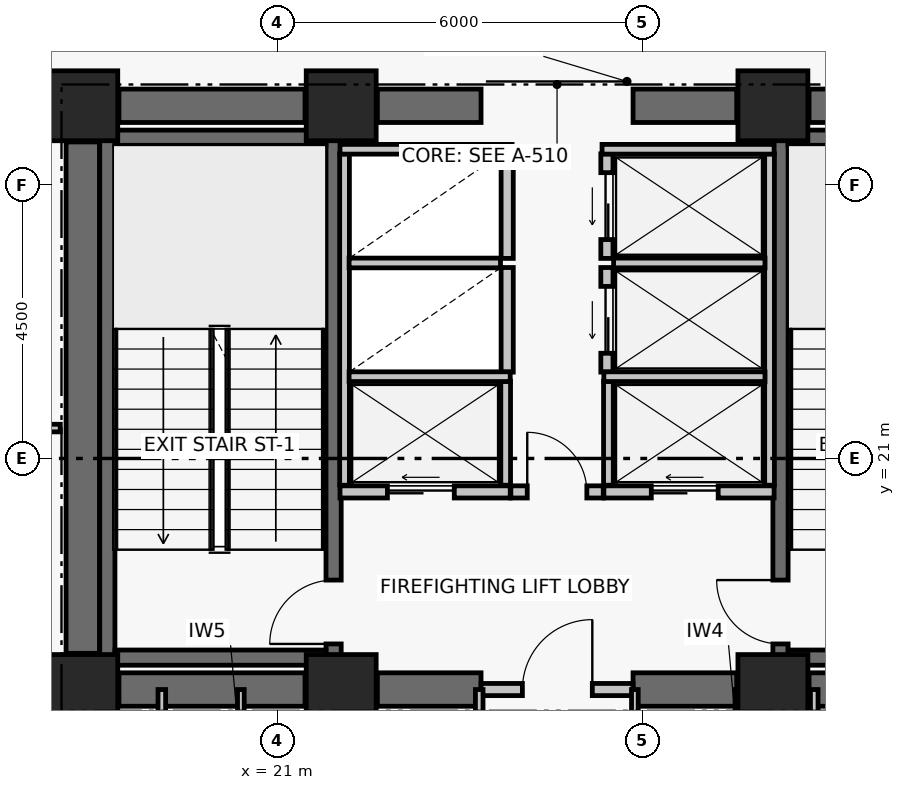
"""IFC4 building model, lengths in metres.
Left out: names, types, materials, properties, quantities, classifications, styles, units other than length and angle.
Written with IfcOpenShell. Run it as: python <this file> out.ifc"""

import sys

from ifc_helpers import new_model, si_unit, direction, frame, frame_2d, origin, origin_2d, place, context, subcontext, project, spatial, rectangle, extrude, element, fill, save


model = new_model("IFC4")
c1 = context("Model", 3, precision=1e-05, world=origin(), true_north=direction((0.0, 1.0)))
c2 = subcontext(c1, "Body", "Model", "MODEL_VIEW")
j1 = project(units=[si_unit("LENGTHUNIT", "METRE"), si_unit("PLANEANGLEUNIT", "RADIAN")], contexts=[c1])
p1 = place(None, origin())
s1 = spatial("IfcSite", under=j1, at=p1, CompositionType="ELEMENT")
p2 = place(p1, origin())
s2 = spatial("IfcBuilding", under=s1, at=p2, CompositionType="ELEMENT")
p3 = place(p2, frame((0.0, 0.0, 103.98)))
s3 = spatial("IfcBuildingStorey", under=s2, at=p3, CompositionType="ELEMENT", Elevation=103.98)
for number, where, z_axis, x_axis in (
    (1, (17.8, 17.2, 0.0), (0.0, 0.0, 1.0), (1.0, 0.0, 0.0)),
    (2, (22.05, 17.2, 0.0), (0.0, 0.0, 1.0), (1.0, 0.0, 0.0)),
    (3, (29.15, 17.2, 0.0), (0.0, 0.0, 1.0), (1.0, 0.0, 0.0)),
    (4, (17.8, 26.8, 0.0), (0.0, 0.0, 1.0), (1.0, 0.0, 0.0)),
    (5, (22.05, 26.8, 0.0), (0.0, 0.0, 1.0), (1.0, 0.0, 0.0)),
    (6, (29.15, 26.8, 0.0), (0.0, 0.0, 1.0), (1.0, 0.0, 0.0)),
):
    element("IfcColumn", number, at=place(p3, frame(where, z_axis=z_axis, x_axis=x_axis)), inside=s3, PredefinedType="COLUMN", context=c2, shape_type="SweptSolid", body=[
        extrude(rectangle(XDim=1.15, YDim=1.15, at=origin_2d()), origin(), (0.0, 0.0, 1.0), 3.72),
    ])
p4 = place(p3, frame((18.395, 17.2, 0.0), z_axis=(0.0, 0.0, 1.0), x_axis=(1.0, 0.0, 0.0)))
e7 = element("IfcWall", 7, at=p4, inside=s3, PredefinedType="SHEAR", context=c2, shape_type="SweptSolid", body=[
    extrude(rectangle(XDim=3.06, YDim=0.55, at=frame_2d((1.53, 0.0))), origin(), (0.0, 0.0, 1.0), 3.47),
])
p5 = place(p3, frame((22.645, 17.2, 0.0), z_axis=(0.0, 0.0, 1.0), x_axis=(1.0, 0.0, 0.0)))
e8 = element("IfcWall", 8, at=p5, inside=s3, PredefinedType="SHEAR", context=c2, shape_type="SweptSolid", body=[
    extrude(rectangle(XDim=1.705, YDim=0.55, at=frame_2d((0.853, 0.0))), origin(), (0.0, 0.0, 1.0), 3.47),
])
p6 = place(p3, frame((26.85, 17.2, 0.0), z_axis=(0.0, 0.0, 1.0), x_axis=(1.0, 0.0, 0.0)))
e9 = element("IfcWall", 9, at=p6, inside=s3, PredefinedType="SHEAR", context=c2, shape_type="SweptSolid", body=[
    extrude(rectangle(XDim=1.705, YDim=0.55, at=frame_2d((0.853, 0.0))), origin(), (0.0, 0.0, 1.0), 3.47),
])
p7 = place(p3, frame((29.745, 17.2, 0.0), z_axis=(0.0, 0.0, 1.0), x_axis=(1.0, 0.0, 0.0)))
e10 = element("IfcWall", 10, at=p7, inside=s3, PredefinedType="SHEAR", context=c2, shape_type="SweptSolid", body=[
    extrude(rectangle(XDim=3.06, YDim=0.55, at=frame_2d((1.53, 0.0))), origin(), (0.0, 0.0, 1.0), 3.47),
])
p8 = place(p3, frame((18.395, 26.8, 0.0), z_axis=(0.0, 0.0, 1.0), x_axis=(1.0, 0.0, 0.0)))
e11 = element("IfcWall", 11, at=p8, inside=s3, PredefinedType="SHEAR", context=c2, shape_type="SweptSolid", body=[
    extrude(rectangle(XDim=3.06, YDim=0.55, at=frame_2d((1.53, 0.0))), origin(), (0.0, 0.0, 1.0), 3.47),
])
p9 = place(p3, frame((22.645, 26.8, 0.0), z_axis=(0.0, 0.0, 1.0), x_axis=(1.0, 0.0, 0.0)))
e12 = element("IfcWall", 12, at=p9, inside=s3, PredefinedType="SHEAR", context=c2, shape_type="SweptSolid", body=[
    extrude(rectangle(XDim=1.705, YDim=0.55, at=frame_2d((0.853, 0.0))), origin(), (0.0, 0.0, 1.0), 3.47),
])
p10 = place(p3, frame((26.85, 26.8, 0.0), z_axis=(0.0, 0.0, 1.0), x_axis=(1.0, 0.0, 0.0)))
e13 = element("IfcWall", 13, at=p10, inside=s3, PredefinedType="SHEAR", context=c2, shape_type="SweptSolid", body=[
    extrude(rectangle(XDim=1.705, YDim=0.55, at=frame_2d((0.853, 0.0))), origin(), (0.0, 0.0, 1.0), 3.47),
])
p11 = place(p3, frame((29.745, 26.8, 0.0), z_axis=(0.0, 0.0, 1.0), x_axis=(1.0, 0.0, 0.0)))
e14 = element("IfcWall", 14, at=p11, inside=s3, PredefinedType="SHEAR", context=c2, shape_type="SweptSolid", body=[
    extrude(rectangle(XDim=3.06, YDim=0.55, at=frame_2d((1.53, 0.0))), origin(), (0.0, 0.0, 1.0), 3.47),
])
p12 = place(p3, frame((17.8, 17.795, 0.0), z_axis=(0.0, 0.0, 1.0), x_axis=(0.0, 1.0, 0.0)))
e15 = element("IfcWall", 15, at=p12, inside=s3, PredefinedType="SHEAR", context=c2, shape_type="SweptSolid", body=[
    extrude(rectangle(XDim=8.41, YDim=0.55, at=frame_2d((4.205, 0.0))), origin(), (0.0, 0.0, 1.0), 3.47),
])
p13 = place(p3, frame((18.204, 17.6, 0.0), z_axis=(0.0, 0.0, 1.0), x_axis=(0.0, 1.0, 0.0)))
e16 = element("IfcWall", 16, at=p13, inside=s3, PredefinedType="SHEAR", context=c2, shape_type="SweptSolid", body=[
    extrude(rectangle(XDim=8.8, YDim=0.25, at=frame_2d((4.4, 0.0))), origin(), (0.0, 0.0, 1.0), 3.47),
])
p14 = place(p3, frame((21.925, 17.6, 0.0), z_axis=(0.0, 0.0, 1.0), x_axis=(0.0, 1.0, 0.0)))
e17 = element("IfcWall", 17, at=p14, inside=s3, PredefinedType="SHEAR", context=c2, shape_type="SweptSolid", body=[
    extrude(rectangle(XDim=8.8, YDim=0.25, at=frame_2d((4.4, 0.0))), origin(), (0.0, 0.0, 1.0), 3.47),
])
p15 = place(p14, frame((0.35, 0.0, 0.0)))
e18 = element("IfcOpeningElement", 18, at=p15, cuts=e17, PredefinedType="OPENING", context=c2, shape_type="SweptSolid", body=[
    extrude(rectangle(XDim=1.05, YDim=2.08, at=frame_2d((0.525, 1.04))), frame((0.0, 0.135, 0.0), z_axis=(0.0, -1.0, 0.0), x_axis=(1.0, 0.0, 0.0)), (0.0, 0.0, 1.0), 0.27),
])
for number, where, z_axis, x_axis in (
    (19, (18.329, 17.725, 0.0), (0.0, 0.0, 1.0), (1.0, 0.0, 0.0)),
    (20, (18.329, 26.275, 0.0), (0.0, 0.0, 1.0), (1.0, 0.0, 0.0)),
):
    element("IfcWall", number, at=place(p3, frame(where, z_axis=z_axis, x_axis=x_axis)), inside=s3, PredefinedType="SHEAR", context=c2, shape_type="SweptSolid", body=[
        extrude(rectangle(XDim=3.471, YDim=0.25, at=frame_2d((1.735, 0.0))), origin(), (0.0, 0.0, 1.0), 3.47),
    ])
p16 = place(p3, frame((29.275, 17.6, 0.0), z_axis=(0.0, 0.0, 1.0), x_axis=(0.0, 1.0, 0.0)))
e21 = element("IfcWall", 21, at=p16, inside=s3, PredefinedType="SHEAR", context=c2, shape_type="SweptSolid", body=[
    extrude(rectangle(XDim=8.8, YDim=0.25, at=frame_2d((4.4, 0.0))), origin(), (0.0, 0.0, 1.0), 3.47),
])
p17 = place(p16, frame((0.35, 0.0, 0.0)))
e22 = element("IfcOpeningElement", 22, at=p17, cuts=e21, PredefinedType="OPENING", context=c2, shape_type="SweptSolid", body=[
    extrude(rectangle(XDim=1.05, YDim=2.08, at=frame_2d((0.525, 1.04))), frame((0.0, 0.135, 0.0), z_axis=(0.0, -1.0, 0.0), x_axis=(1.0, 0.0, 0.0)), (0.0, 0.0, 1.0), 0.27),
])
for number, where, z_axis, x_axis in (
    (23, (29.4, 17.725, 0.0), (0.0, 0.0, 1.0), (1.0, 0.0, 0.0)),
    (24, (29.4, 26.275, 0.0), (0.0, 0.0, 1.0), (1.0, 0.0, 0.0)),
):
    element("IfcWall", number, at=place(p3, frame(where, z_axis=z_axis, x_axis=x_axis)), inside=s3, PredefinedType="SHEAR", context=c2, shape_type="SweptSolid", body=[
        extrude(rectangle(XDim=3.471, YDim=0.25, at=frame_2d((1.736, 0.0))), origin(), (0.0, 0.0, 1.0), 3.47),
    ])
p18 = place(p3, frame((24.35, 17.2, 0.0), z_axis=(0.0, 0.0, 1.0), x_axis=(1.0, 0.0, 0.0)))
e25 = element("IfcWall", 25, at=p18, inside=s3, PredefinedType="PARTITIONING", context=c2, shape_type="SweptSolid", body=[
    extrude(rectangle(XDim=2.5, YDim=0.2, at=frame_2d((1.25, 0.0))), origin(), (0.0, 0.0, 1.0), 2.6),
])
p19 = place(p18, frame((0.68, 0.0, 0.0)))
e26 = element("IfcOpeningElement", 26, at=p19, cuts=e25, PredefinedType="OPENING", context=c2, shape_type="SweptSolid", body=[
    extrude(rectangle(XDim=1.15, YDim=2.08, at=frame_2d((0.575, 1.04))), frame((0.0, 0.11, 0.0), z_axis=(0.0, -1.0, 0.0), x_axis=(1.0, 0.0, 0.0)), (0.0, 0.0, 1.0), 0.22),
])
p20 = place(p3, frame((24.84, 20.45, 0.0), z_axis=(0.0, 0.0, 1.0), x_axis=(1.0, 0.0, 0.0)))
e27 = element("IfcWall", 27, at=p20, inside=s3, PredefinedType="PARTITIONING", context=c2, shape_type="SweptSolid", body=[
    extrude(rectangle(XDim=1.52, YDim=0.2, at=frame_2d((0.76, 0.0))), origin(), (0.0, 0.0, 1.0), 3.47),
])
p21 = place(p20, frame((0.27, 0.0, 0.0)))
e28 = element("IfcOpeningElement", 28, at=p21, cuts=e27, PredefinedType="OPENING", context=c2, shape_type="SweptSolid", body=[
    extrude(rectangle(XDim=0.98, YDim=2.06, at=frame_2d((0.49, 1.03))), frame((0.0, 0.11, 0.0), z_axis=(0.0, -1.0, 0.0), x_axis=(1.0, 0.0, 0.0)), (0.0, 0.0, 1.0), 0.22),
])
p22 = place(p3, frame((22.03, 20.45, 0.0), z_axis=(0.0, 0.0, 1.0), x_axis=(1.0, 0.0, 0.0)))
e29 = element("IfcWall", 29, at=p22, inside=s3, PredefinedType="PARTITIONING", context=c2, shape_type="SweptSolid", body=[
    extrude(rectangle(XDim=2.8, YDim=0.2, at=frame_2d((1.4, 0.0))), origin(), (0.0, 0.0, 1.0), 3.47),
])
p23 = place(p22, frame((0.78, 0.0, 0.0)))
e30 = element("IfcOpeningElement", 30, at=p23, cuts=e29, PredefinedType="OPENING", context=c2, shape_type="SweptSolid", body=[
    extrude(rectangle(XDim=1.1, YDim=2.08, at=frame_2d((0.55, 1.04))), frame((0.0, 0.11, 0.0), z_axis=(0.0, -1.0, 0.0), x_axis=(1.0, 0.0, 0.0)), (0.0, 0.0, 1.0), 0.22),
])
p24 = place(p3, frame((26.37, 20.45, 0.0), z_axis=(0.0, 0.0, 1.0), x_axis=(1.0, 0.0, 0.0)))
e31 = element("IfcWall", 31, at=p24, inside=s3, PredefinedType="PARTITIONING", context=c2, shape_type="SweptSolid", body=[
    extrude(rectangle(XDim=2.8, YDim=0.2, at=frame_2d((1.4, 0.0))), origin(), (0.0, 0.0, 1.0), 3.47),
])
p25 = place(p24, frame((0.78, 0.0, 0.0)))
e32 = element("IfcOpeningElement", 32, at=p25, cuts=e31, PredefinedType="OPENING", context=c2, shape_type="SweptSolid", body=[
    extrude(rectangle(XDim=1.1, YDim=2.08, at=frame_2d((0.55, 1.04))), frame((0.0, 0.11, 0.0), z_axis=(0.0, -1.0, 0.0), x_axis=(1.0, 0.0, 0.0)), (0.0, 0.0, 1.0), 0.22),
])
for number, where, z_axis, x_axis in (
    (33, (24.78, 22.42, 0.0), (0.0, 0.0, 1.0), (0.0, 1.0, 0.0)),
    (34, (24.78, 24.29, 0.0), (0.0, 0.0, 1.0), (0.0, 1.0, 0.0)),
):
    element("IfcWall", number, at=place(p3, frame(where, z_axis=z_axis, x_axis=x_axis)), inside=s3, PredefinedType="PARTITIONING", context=c2, shape_type="SweptSolid", body=[
        extrude(rectangle(XDim=1.72, YDim=0.2, at=frame_2d((0.86, 0.0))), origin(), (0.0, 0.0, 1.0), 3.47),
    ])
p26 = place(p3, frame((26.42, 22.42, 0.0), z_axis=(0.0, 0.0, 1.0), x_axis=(0.0, 1.0, 0.0)))
e35 = element("IfcWall", 35, at=p26, inside=s3, PredefinedType="PARTITIONING", context=c2, shape_type="SweptSolid", body=[
    extrude(rectangle(XDim=1.72, YDim=0.2, at=frame_2d((0.86, 0.0))), origin(), (0.0, 0.0, 1.0), 3.47),
])
p27 = place(p26, frame((0.31, 0.0, 0.0)))
e36 = element("IfcOpeningElement", 36, at=p27, cuts=e35, PredefinedType="OPENING", context=c2, shape_type="SweptSolid", body=[
    extrude(rectangle(XDim=1.1, YDim=2.08, at=frame_2d((0.55, 1.04))), frame((0.0, 0.11, 0.0), z_axis=(0.0, -1.0, 0.0), x_axis=(1.0, 0.0, 0.0)), (0.0, 0.0, 1.0), 0.22),
])
p28 = place(p3, frame((26.42, 24.29, 0.0), z_axis=(0.0, 0.0, 1.0), x_axis=(0.0, 1.0, 0.0)))
e37 = element("IfcWall", 37, at=p28, inside=s3, PredefinedType="PARTITIONING", context=c2, shape_type="SweptSolid", body=[
    extrude(rectangle(XDim=1.72, YDim=0.2, at=frame_2d((0.86, 0.0))), origin(), (0.0, 0.0, 1.0), 3.47),
])
p29 = place(p28, frame((0.31, 0.0, 0.0)))
e38 = element("IfcOpeningElement", 38, at=p29, cuts=e37, PredefinedType="OPENING", context=c2, shape_type="SweptSolid", body=[
    extrude(rectangle(XDim=1.1, YDim=2.08, at=frame_2d((0.55, 1.04))), frame((0.0, 0.11, 0.0), z_axis=(0.0, -1.0, 0.0), x_axis=(1.0, 0.0, 0.0)), (0.0, 0.0, 1.0), 0.22),
])
p30 = place(p3, frame((22.105, 20.56, 0.0), z_axis=(0.0, 0.0, 1.0), x_axis=(0.0, 1.0, 0.0)))
e39 = element("IfcWall", 39, at=p30, inside=s3, PredefinedType="PARTITIONING", context=c2, shape_type="SweptSolid", body=[
    extrude(rectangle(XDim=5.45, YDim=0.16, at=frame_2d((2.725, 0.0))), origin(), (0.0, 0.0, 1.0), 3.47),
])
p31 = place(p3, frame((24.755, 20.56, 0.0), z_axis=(0.0, 0.0, 1.0), x_axis=(0.0, 1.0, 0.0)))
e40 = element("IfcWall", 40, at=p31, inside=s3, PredefinedType="PARTITIONING", context=c2, shape_type="SweptSolid", body=[
    extrude(rectangle(XDim=1.71, YDim=0.16, at=frame_2d((0.855, 0.0))), origin(), (0.0, 0.0, 1.0), 3.47),
])
p32 = place(p3, frame((22.18, 22.345, 0.0), z_axis=(0.0, 0.0, 1.0), x_axis=(1.0, 0.0, 0.0)))
e41 = element("IfcWall", 41, at=p32, inside=s3, PredefinedType="PARTITIONING", context=c2, shape_type="SweptSolid", body=[
    extrude(rectangle(XDim=2.65, YDim=0.16, at=frame_2d((1.325, 0.0))), origin(), (0.0, 0.0, 1.0), 3.47),
])
p33 = place(p3, frame((22.18, 24.215, 0.0), z_axis=(0.0, 0.0, 1.0), x_axis=(1.0, 0.0, 0.0)))
e42 = element("IfcWall", 42, at=p33, inside=s3, PredefinedType="PARTITIONING", context=c2, shape_type="SweptSolid", body=[
    extrude(rectangle(XDim=2.49, YDim=0.16, at=frame_2d((1.245, 0.0))), origin(), (0.0, 0.0, 1.0), 3.47),
])
p34 = place(p3, frame((22.03, 26.085, 0.0), z_axis=(0.0, 0.0, 1.0), x_axis=(1.0, 0.0, 0.0)))
e43 = element("IfcWall", 43, at=p34, inside=s3, PredefinedType="PARTITIONING", context=c2, shape_type="SweptSolid", body=[
    extrude(rectangle(XDim=2.83, YDim=0.16, at=frame_2d((1.415, 0.0))), origin(), (0.0, 0.0, 1.0), 3.47),
])
p35 = place(p3, frame((29.095, 20.56, 0.0), z_axis=(0.0, 0.0, 1.0), x_axis=(0.0, 1.0, 0.0)))
e44 = element("IfcWall", 44, at=p35, inside=s3, PredefinedType="PARTITIONING", context=c2, shape_type="SweptSolid", body=[
    extrude(rectangle(XDim=5.45, YDim=0.16, at=frame_2d((2.725, 0.0))), origin(), (0.0, 0.0, 1.0), 3.47),
])
p36 = place(p3, frame((26.445, 20.56, 0.0), z_axis=(0.0, 0.0, 1.0), x_axis=(0.0, 1.0, 0.0)))
e45 = element("IfcWall", 45, at=p36, inside=s3, PredefinedType="PARTITIONING", context=c2, shape_type="SweptSolid", body=[
    extrude(rectangle(XDim=1.71, YDim=0.16, at=frame_2d((0.855, 0.0))), origin(), (0.0, 0.0, 1.0), 3.47),
])
p37 = place(p3, frame((26.37, 22.345, 0.0), z_axis=(0.0, 0.0, 1.0), x_axis=(1.0, 0.0, 0.0)))
e46 = element("IfcWall", 46, at=p37, inside=s3, PredefinedType="PARTITIONING", context=c2, shape_type="SweptSolid", body=[
    extrude(rectangle(XDim=2.65, YDim=0.16, at=frame_2d((1.325, 0.0))), origin(), (0.0, 0.0, 1.0), 3.47),
])
p38 = place(p3, frame((26.53, 24.215, 0.0), z_axis=(0.0, 0.0, 1.0), x_axis=(1.0, 0.0, 0.0)))
e47 = element("IfcWall", 47, at=p38, inside=s3, PredefinedType="PARTITIONING", context=c2, shape_type="SweptSolid", body=[
    extrude(rectangle(XDim=2.49, YDim=0.16, at=frame_2d((1.245, 0.0))), origin(), (0.0, 0.0, 1.0), 3.47),
])
p39 = place(p3, frame((26.34, 26.085, 0.0), z_axis=(0.0, 0.0, 1.0), x_axis=(1.0, 0.0, 0.0)))
e48 = element("IfcWall", 48, at=p39, inside=s3, PredefinedType="PARTITIONING", context=c2, shape_type="SweptSolid", body=[
    extrude(rectangle(XDim=2.83, YDim=0.16, at=frame_2d((1.415, 0.0))), origin(), (0.0, 0.0, 1.0), 3.47),
])
p40 = place(p3, frame((19.1, 14.95, 0.0), z_axis=(0.0, 0.0, 1.0), x_axis=(0.0, 1.0, 0.0)))
e49 = element("IfcWall", 49, at=p40, inside=s3, PredefinedType="PARTITIONING", context=c2, shape_type="SweptSolid", body=[
    extrude(rectangle(XDim=2.25, YDim=0.125, at=frame_2d((1.125, 0.0))), origin(), (0.0, 0.0, 1.0), 2.6),
])
p41 = place(p3, frame((20.4, 14.95, 0.0), z_axis=(0.0, 0.0, 1.0), x_axis=(0.0, 1.0, 0.0)))
e50 = element("IfcWall", 50, at=p41, inside=s3, PredefinedType="PARTITIONING", context=c2, shape_type="SweptSolid", body=[
    extrude(rectangle(XDim=2.25, YDim=0.11, at=frame_2d((1.125, 0.0))), origin(), (0.0, 0.0, 1.0), 2.6),
])
for number, where, z_axis, x_axis in (
    (51, (22.36, 14.95, 0.0), (0.0, 0.0, 1.0), (0.0, 1.0, 0.0)),
    (52, (24.32, 14.95, 0.0), (0.0, 0.0, 1.0), (0.0, 1.0, 0.0)),
):
    element("IfcWall", number, at=place(p3, frame(where, z_axis=z_axis, x_axis=x_axis)), inside=s3, PredefinedType="PARTITIONING", context=c2, shape_type="SweptSolid", body=[
        extrude(rectangle(XDim=2.25, YDim=0.125, at=frame_2d((1.125, 0.0))), origin(), (0.0, 0.0, 1.0), 2.6),
    ])
p42 = place(p3, frame((26.88, 14.95, 0.0), z_axis=(0.0, 0.0, 1.0), x_axis=(0.0, 1.0, 0.0)))
e53 = element("IfcWall", 53, at=p42, inside=s3, PredefinedType="PARTITIONING", context=c2, shape_type="SweptSolid", body=[
    extrude(rectangle(XDim=2.25, YDim=0.11, at=frame_2d((1.125, 0.0))), origin(), (0.0, 0.0, 1.0), 2.6),
])
for number, where, z_axis, x_axis in (
    (54, (28.59, 14.95, 0.0), (0.0, 0.0, 1.0), (0.0, 1.0, 0.0)),
    (55, (29.83, 14.95, 0.0), (0.0, 0.0, 1.0), (0.0, 1.0, 0.0)),
):
    element("IfcWall", number, at=place(p3, frame(where, z_axis=z_axis, x_axis=x_axis)), inside=s3, PredefinedType="PARTITIONING", context=c2, shape_type="SweptSolid", body=[
        extrude(rectangle(XDim=2.25, YDim=0.125, at=frame_2d((1.125, 0.0))), origin(), (0.0, 0.0, 1.0), 2.6),
    ])
p43 = place(p3, frame((31.598, 26.8, 0.0), z_axis=(0.0, 0.0, 1.0), x_axis=(-0.831758510993, 0.555137622028, 0.0)))
e56 = element("IfcWall", 56, at=p43, inside=s3, PredefinedType="PARTITIONING", context=c2, shape_type="SweptSolid", body=[
    extrude(rectangle(XDim=2.833, YDim=0.145, at=frame_2d((1.417, 0.0))), origin(), (0.0, 0.0, 1.0), 2.6),
])
p44 = place(p3, frame((15.2, 27.06, 0.0), z_axis=(0.0, 0.0, 1.0), x_axis=(1.0, 0.0, 0.0)))
e57 = element("IfcWall", 57, at=p44, inside=s3, PredefinedType="PARTITIONING", context=c2, shape_type="SweptSolid", body=[
    extrude(rectangle(XDim=2.18, YDim=0.145, at=frame_2d((1.09, 0.0))), origin(), (0.0, 0.0, 1.0), 2.65),
])
p45 = place(p3, frame((3.128, 21.5, 0.0), z_axis=(0.0, 0.0, 1.0), x_axis=(1.0, 0.0, 0.0)))
e58 = element("IfcWall", 58, at=p45, inside=s3, PredefinedType="PARTITIONING", context=c2, shape_type="SweptSolid", body=[
    extrude(rectangle(XDim=14.302, YDim=0.125, at=frame_2d((7.151, 0.0))), origin(), (0.0, 0.0, 1.0), 2.6),
])
p46 = place(p45, frame((0.28, 0.0, 0.0)))
e59 = element("IfcOpeningElement", 59, at=p46, cuts=e58, PredefinedType="OPENING", context=c2, shape_type="SweptSolid", body=[
    extrude(rectangle(XDim=0.92, YDim=2.05, at=frame_2d((0.46, 1.025))), frame((0.0, 0.073, 0.0), z_axis=(0.0, -1.0, 0.0), x_axis=(1.0, 0.0, 0.0)), (0.0, 0.0, 1.0), 0.145),
])
p47 = place(p15, origin())
e60 = element("IfcDoor", 60, at=p47, inside=s3, OperationType="SINGLE_SWING_LEFT", PredefinedType="DOOR", context=c2, shape_type="SweptSolid", body=[
    extrude(rectangle(XDim=1.05, YDim=2.08, at=frame_2d((0.525, 1.04))), frame((0.0, 0.025, 0.0), z_axis=(0.0, -1.0, 0.0), x_axis=(1.0, 0.0, 0.0)), (0.0, 0.0, 1.0), 0.05),
])
fill(e18, e60)
p48 = place(p17, origin())
e61 = element("IfcDoor", 61, at=p48, inside=s3, OperationType="SINGLE_SWING_RIGHT", PredefinedType="DOOR", context=c2, shape_type="SweptSolid", body=[
    extrude(rectangle(XDim=1.05, YDim=2.08, at=frame_2d((0.525, 1.04))), frame((0.0, 0.025, 0.0), z_axis=(0.0, -1.0, 0.0), x_axis=(1.0, 0.0, 0.0)), (0.0, 0.0, 1.0), 0.05),
])
fill(e22, e61)
p49 = place(p19, origin())
e62 = element("IfcDoor", 62, at=p49, inside=s3, OperationType="SINGLE_SWING_RIGHT", PredefinedType="DOOR", context=c2, shape_type="SweptSolid", body=[
    extrude(rectangle(XDim=1.15, YDim=2.08, at=frame_2d((0.575, 1.04))), frame((0.0, 0.025, 0.0), z_axis=(0.0, -1.0, 0.0), x_axis=(1.0, 0.0, 0.0)), (0.0, 0.0, 1.0), 0.05),
])
fill(e26, e62)
p50 = place(p21, origin())
e63 = element("IfcDoor", 63, at=p50, inside=s3, OperationType="SINGLE_SWING_LEFT", PredefinedType="DOOR", context=c2, shape_type="SweptSolid", body=[
    extrude(rectangle(XDim=0.98, YDim=2.06, at=frame_2d((0.49, 1.03))), frame((0.0, 0.025, 0.0), z_axis=(0.0, -1.0, 0.0), x_axis=(1.0, 0.0, 0.0)), (0.0, 0.0, 1.0), 0.05),
])
fill(e28, e63)
p51 = place(p23, origin())
e64 = element("IfcDoor", 64, at=p51, inside=s3, OperationType="DOUBLE_DOOR_SLIDING", PredefinedType="DOOR", context=c2, shape_type="SweptSolid", body=[
    extrude(rectangle(XDim=1.1, YDim=2.08, at=frame_2d((0.55, 1.04))), frame((0.0, 0.025, 0.0), z_axis=(0.0, -1.0, 0.0), x_axis=(1.0, 0.0, 0.0)), (0.0, 0.0, 1.0), 0.05),
])
fill(e30, e64)
p52 = place(p25, origin())
e65 = element("IfcDoor", 65, at=p52, inside=s3, OperationType="DOUBLE_DOOR_SLIDING", PredefinedType="DOOR", context=c2, shape_type="SweptSolid", body=[
    extrude(rectangle(XDim=1.1, YDim=2.08, at=frame_2d((0.55, 1.04))), frame((0.0, 0.025, 0.0), z_axis=(0.0, -1.0, 0.0), x_axis=(1.0, 0.0, 0.0)), (0.0, 0.0, 1.0), 0.05),
])
fill(e32, e65)
p53 = place(p27, origin())
e66 = element("IfcDoor", 66, at=p53, inside=s3, OperationType="DOUBLE_DOOR_SLIDING", PredefinedType="DOOR", context=c2, shape_type="SweptSolid", body=[
    extrude(rectangle(XDim=1.1, YDim=2.08, at=frame_2d((0.55, 1.04))), frame((0.0, 0.025, 0.0), z_axis=(0.0, -1.0, 0.0), x_axis=(1.0, 0.0, 0.0)), (0.0, 0.0, 1.0), 0.05),
])
fill(e36, e66)
p54 = place(p29, origin())
e67 = element("IfcDoor", 67, at=p54, inside=s3, OperationType="DOUBLE_DOOR_SLIDING", PredefinedType="DOOR", context=c2, shape_type="SweptSolid", body=[
    extrude(rectangle(XDim=1.1, YDim=2.08, at=frame_2d((0.55, 1.04))), frame((0.0, 0.025, 0.0), z_axis=(0.0, -1.0, 0.0), x_axis=(1.0, 0.0, 0.0)), (0.0, 0.0, 1.0), 0.05),
])
fill(e38, e67)
save(model, sys.argv[1])
